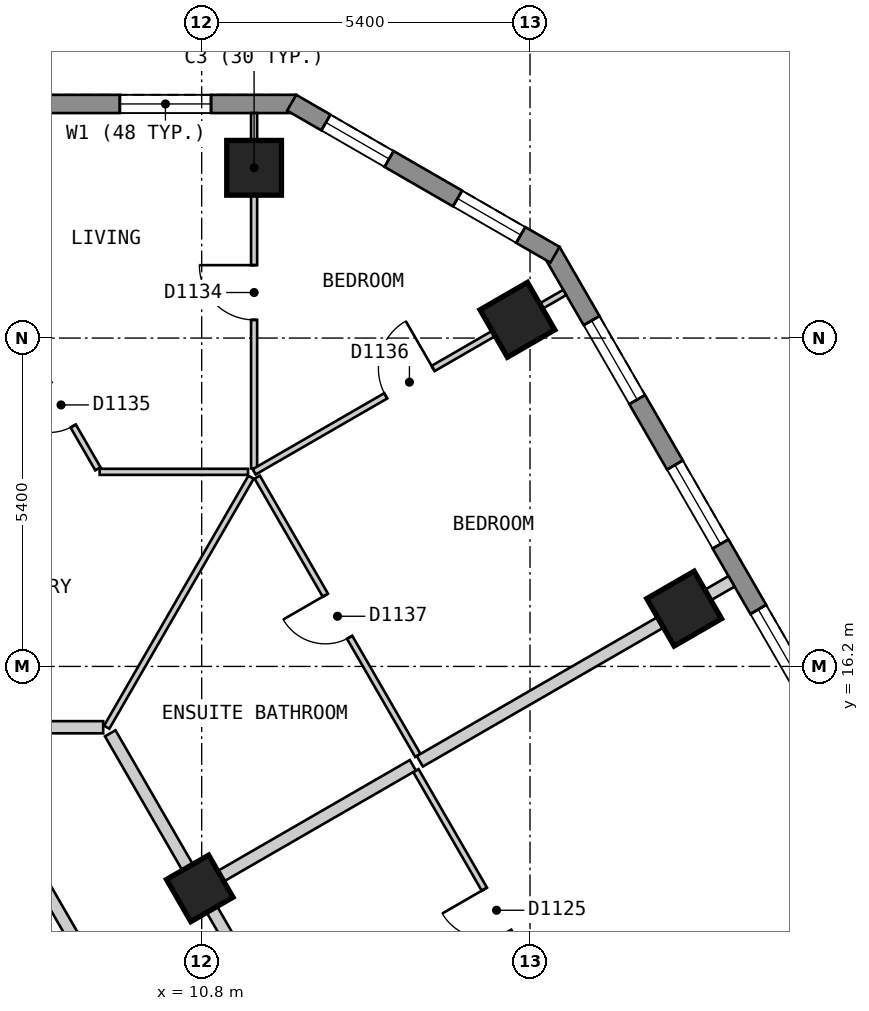
"""IFC4 building model, lengths in metres.
Left out: names, types, materials, properties, quantities, classifications, styles, units other than length and angle.
Written with IfcOpenShell. Run it as: python <this file> out.ifc"""

import sys

from ifc_helpers import new_model, si_unit, direction, frame, frame_2d, origin, origin_2d, place, context, subcontext, project, spatial, polyline, rectangle, outline, extrude, element, fill, save


model = new_model("IFC4")
c1 = context("Model", 3, precision=1e-05, world=origin(), true_north=direction((0.0, 1.0)))
c2 = subcontext(c1, "Body", "Model", "MODEL_VIEW")
j1 = project(units=[si_unit("LENGTHUNIT", "METRE"), si_unit("PLANEANGLEUNIT", "RADIAN")], contexts=[c1])
p1 = place(None, origin())
s1 = spatial("IfcSite", under=j1, at=p1, CompositionType="ELEMENT")
p2 = place(p1, origin())
s2 = spatial("IfcBuilding", under=s1, at=p2, CompositionType="ELEMENT")
p3 = place(p2, frame((0.0, 0.0, 138.6)))
s3 = spatial("IfcBuildingStorey", under=s2, at=p3, CompositionType="ELEMENT", Elevation=138.6)
for number, where, z_axis, x_axis in (
    (1, (11.662, 24.4, 0.0), (0.0, 0.0, 1.0), (-1.0, 0.0, 0.0)),
    (2, (18.735, 17.15, 0.0), (0.0, 0.0, 1.0), (-0.5, 0.866, 0.0)),
    (3, (15.993, 21.9, 0.0), (0.0, 0.0, 1.0), (-0.5, 0.866, 0.0)),
):
    element("IfcColumn", number, at=place(p3, frame(where, z_axis=z_axis, x_axis=x_axis)), inside=s3, PredefinedType="COLUMN", context=c2, shape_type="SweptSolid", body=[
        extrude(rectangle(XDim=0.9, YDim=0.9, at=origin_2d()), origin(), (0.0, 0.0, 1.0), 3.0),
    ])
p4 = place(p3, frame((10.768, 12.55, 0.0), z_axis=(0.0, 0.0, 1.0), x_axis=(-0.5, 0.866025403784, 0.0)))
e4 = element("IfcColumn", 4, at=p4, inside=s3, PredefinedType="COLUMN", context=c2, shape_type="SweptSolid", body=[
    extrude(rectangle(XDim=0.8, YDim=0.8, at=origin_2d()), origin(), (0.0, 0.0, 1.0), 3.0),
])
p5 = place(p3, frame((12.355, 25.45, 0.0), z_axis=(0.0, 0.0, 1.0), x_axis=(-1.0, 0.0, 0.0)))
e5 = element("IfcWall", 5, at=p5, inside=s3, PredefinedType="SOLIDWALL", context=c2, shape_type="SweptSolid", body=[
    extrude(outline(polyline([(0.0, -0.15), (24.71, -0.15), (24.63, 0.15), (0.08, 0.15), (0.0, -0.15)])), origin(), (0.0, 0.0, 1.0), 2.7),
])
p6 = place(p5, frame((1.401, 0.0, 0.15)))
e6 = element("IfcOpeningElement", 6, at=p6, cuts=e5, PredefinedType="OPENING", context=c2, shape_type="SweptSolid", body=[
    extrude(rectangle(XDim=1.5, YDim=2.1, at=frame_2d((0.75, 1.05))), frame((0.0, 0.16, 0.0), z_axis=(0.0, -1.0, 0.0), x_axis=(1.0, 0.0, 0.0)), (0.0, 0.0, 1.0), 0.32),
])
p7 = place(p5, frame((4.316, 0.0, 0.15)))
e7 = element("IfcOpeningElement", 7, at=p7, cuts=e5, PredefinedType="OPENING", context=c2, shape_type="SweptSolid", body=[
    extrude(rectangle(XDim=1.5, YDim=2.1, at=frame_2d((0.75, 1.05))), frame((0.0, 0.16, 0.0), z_axis=(0.0, -1.0, 0.0), x_axis=(1.0, 0.0, 0.0)), (0.0, 0.0, 1.0), 0.32),
])
p8 = place(p5, frame((7.232, 0.0, 0.15)))
e8 = element("IfcOpeningElement", 8, at=p8, cuts=e5, PredefinedType="OPENING", context=c2, shape_type="SweptSolid", body=[
    extrude(rectangle(XDim=1.5, YDim=2.1, at=frame_2d((0.75, 1.05))), frame((0.0, 0.16, 0.0), z_axis=(0.0, -1.0, 0.0), x_axis=(1.0, 0.0, 0.0)), (0.0, 0.0, 1.0), 0.32),
])
p9 = place(p5, frame((10.147, 0.0, 0.15)))
e9 = element("IfcOpeningElement", 9, at=p9, cuts=e5, PredefinedType="OPENING", context=c2, shape_type="SweptSolid", body=[
    extrude(rectangle(XDim=1.5, YDim=2.1, at=frame_2d((0.75, 1.05))), frame((0.0, 0.16, 0.0), z_axis=(0.0, -1.0, 0.0), x_axis=(1.0, 0.0, 0.0)), (0.0, 0.0, 1.0), 0.32),
])
p10 = place(p5, frame((13.063, 0.0, 0.15)))
e10 = element("IfcOpeningElement", 10, at=p10, cuts=e5, PredefinedType="OPENING", context=c2, shape_type="SweptSolid", body=[
    extrude(rectangle(XDim=1.5, YDim=2.1, at=frame_2d((0.75, 1.05))), frame((0.0, 0.16, 0.0), z_axis=(0.0, -1.0, 0.0), x_axis=(1.0, 0.0, 0.0)), (0.0, 0.0, 1.0), 0.32),
])
p11 = place(p5, frame((15.978, 0.0, 0.15)))
e11 = element("IfcOpeningElement", 11, at=p11, cuts=e5, PredefinedType="OPENING", context=c2, shape_type="SweptSolid", body=[
    extrude(rectangle(XDim=1.5, YDim=2.1, at=frame_2d((0.75, 1.05))), frame((0.0, 0.16, 0.0), z_axis=(0.0, -1.0, 0.0), x_axis=(1.0, 0.0, 0.0)), (0.0, 0.0, 1.0), 0.32),
])
p12 = place(p5, frame((18.894, 0.0, 0.15)))
e12 = element("IfcOpeningElement", 12, at=p12, cuts=e5, PredefinedType="OPENING", context=c2, shape_type="SweptSolid", body=[
    extrude(rectangle(XDim=1.5, YDim=2.1, at=frame_2d((0.75, 1.05))), frame((0.0, 0.16, 0.0), z_axis=(0.0, -1.0, 0.0), x_axis=(1.0, 0.0, 0.0)), (0.0, 0.0, 1.0), 0.32),
])
p13 = place(p5, frame((21.809, 0.0, 0.15)))
e13 = element("IfcOpeningElement", 13, at=p13, cuts=e5, PredefinedType="OPENING", context=c2, shape_type="SweptSolid", body=[
    extrude(rectangle(XDim=1.5, YDim=2.1, at=frame_2d((0.75, 1.05))), frame((0.0, 0.16, 0.0), z_axis=(0.0, -1.0, 0.0), x_axis=(1.0, 0.0, 0.0)), (0.0, 0.0, 1.0), 0.32),
])
p14 = place(p3, frame((28.218, 2.825, 0.0), z_axis=(0.0, 0.0, 1.0), x_axis=(-0.500020536353, 0.866013546791, 0.0)))
e14 = element("IfcWall", 14, at=p14, inside=s3, PredefinedType="SOLIDWALL", context=c2, shape_type="SweptSolid", body=[
    extrude(outline(polyline([(0.0, -0.15), (23.325, -0.15), (23.245, 0.15), (0.08, 0.15), (0.0, -0.15)])), origin(), (0.0, 0.0, 1.0), 2.7),
])
p15 = place(p14, frame((1.314, 0.0, 0.15)))
e15 = element("IfcOpeningElement", 15, at=p15, cuts=e14, PredefinedType="OPENING", context=c2, shape_type="SweptSolid", body=[
    extrude(rectangle(XDim=1.5, YDim=2.1, at=frame_2d((0.75, 1.05))), frame((0.0, 0.16, 0.0), z_axis=(0.0, -1.0, 0.0), x_axis=(1.0, 0.0, 0.0)), (0.0, 0.0, 1.0), 0.32),
])
p16 = place(p14, frame((4.056, 0.0, 0.15)))
e16 = element("IfcOpeningElement", 16, at=p16, cuts=e14, PredefinedType="OPENING", context=c2, shape_type="SweptSolid", body=[
    extrude(rectangle(XDim=1.5, YDim=2.1, at=frame_2d((0.75, 1.05))), frame((0.0, 0.16, 0.0), z_axis=(0.0, -1.0, 0.0), x_axis=(1.0, 0.0, 0.0)), (0.0, 0.0, 1.0), 0.32),
])
p17 = place(p14, frame((6.798, 0.0, 0.15)))
e17 = element("IfcOpeningElement", 17, at=p17, cuts=e14, PredefinedType="OPENING", context=c2, shape_type="SweptSolid", body=[
    extrude(rectangle(XDim=1.5, YDim=2.1, at=frame_2d((0.75, 1.05))), frame((0.0, 0.16, 0.0), z_axis=(0.0, -1.0, 0.0), x_axis=(1.0, 0.0, 0.0)), (0.0, 0.0, 1.0), 0.32),
])
p18 = place(p14, frame((9.541, 0.0, 0.15)))
e18 = element("IfcOpeningElement", 18, at=p18, cuts=e14, PredefinedType="OPENING", context=c2, shape_type="SweptSolid", body=[
    extrude(rectangle(XDim=1.5, YDim=2.1, at=frame_2d((0.75, 1.05))), frame((0.0, 0.16, 0.0), z_axis=(0.0, -1.0, 0.0), x_axis=(1.0, 0.0, 0.0)), (0.0, 0.0, 1.0), 0.32),
])
p19 = place(p14, frame((12.284, 0.0, 0.15)))
e19 = element("IfcOpeningElement", 19, at=p19, cuts=e14, PredefinedType="OPENING", context=c2, shape_type="SweptSolid", body=[
    extrude(rectangle(XDim=1.5, YDim=2.1, at=frame_2d((0.75, 1.05))), frame((0.0, 0.16, 0.0), z_axis=(0.0, -1.0, 0.0), x_axis=(1.0, 0.0, 0.0)), (0.0, 0.0, 1.0), 0.32),
])
p20 = place(p14, frame((15.027, 0.0, 0.15)))
e20 = element("IfcOpeningElement", 20, at=p20, cuts=e14, PredefinedType="OPENING", context=c2, shape_type="SweptSolid", body=[
    extrude(rectangle(XDim=1.5, YDim=2.1, at=frame_2d((0.75, 1.05))), frame((0.0, 0.16, 0.0), z_axis=(0.0, -1.0, 0.0), x_axis=(1.0, 0.0, 0.0)), (0.0, 0.0, 1.0), 0.32),
])
p21 = place(p14, frame((17.769, 0.0, 0.15)))
e21 = element("IfcOpeningElement", 21, at=p21, cuts=e14, PredefinedType="OPENING", context=c2, shape_type="SweptSolid", body=[
    extrude(rectangle(XDim=1.5, YDim=2.1, at=frame_2d((0.75, 1.05))), frame((0.0, 0.16, 0.0), z_axis=(0.0, -1.0, 0.0), x_axis=(1.0, 0.0, 0.0)), (0.0, 0.0, 1.0), 0.32),
])
p22 = place(p14, frame((20.511, 0.0, 0.15)))
e22 = element("IfcOpeningElement", 22, at=p22, cuts=e14, PredefinedType="OPENING", context=c2, shape_type="SweptSolid", body=[
    extrude(rectangle(XDim=1.5, YDim=2.1, at=frame_2d((0.75, 1.05))), frame((0.0, 0.16, 0.0), z_axis=(0.0, -1.0, 0.0), x_axis=(1.0, 0.0, 0.0)), (0.0, 0.0, 1.0), 0.32),
])
p23 = place(p3, frame((16.61, 22.97, 0.0), z_axis=(0.0, 0.0, 1.0), x_axis=(-0.866022959057, 0.500004234368, 0.0)))
e23 = element("IfcWall", 23, at=p23, inside=s3, PredefinedType="SOLIDWALL", context=c2, shape_type="SweptSolid", body=[
    extrude(outline(polyline([(0.0, -0.15), (5.0, -0.15), (4.92, 0.15), (0.08, 0.15), (0.0, -0.15)])), origin(), (0.0, 0.0, 1.0), 2.7),
])
p24 = place(p23, frame((0.65, 0.0, 0.15)))
e24 = element("IfcOpeningElement", 24, at=p24, cuts=e23, PredefinedType="OPENING", context=c2, shape_type="SweptSolid", body=[
    extrude(rectangle(XDim=1.2, YDim=2.1, at=frame_2d((0.6, 1.05))), frame((0.0, 0.16, 0.0), z_axis=(0.0, -1.0, 0.0), x_axis=(1.0, 0.0, 0.0)), (0.0, 0.0, 1.0), 0.32),
])
p25 = place(p23, frame((3.15, 0.0, 0.15)))
e25 = element("IfcOpeningElement", 25, at=p25, cuts=e23, PredefinedType="OPENING", context=c2, shape_type="SweptSolid", body=[
    extrude(rectangle(XDim=1.2, YDim=2.1, at=frame_2d((0.6, 1.05))), frame((0.0, 0.16, 0.0), z_axis=(0.0, -1.0, 0.0), x_axis=(1.0, 0.0, 0.0)), (0.0, 0.0, 1.0), 0.32),
])
p26 = place(p3, frame((7.967, 13.0, 0.0), z_axis=(0.0, 0.0, 1.0), x_axis=(0.50003774998, -0.866003607726, 0.0)))
e26 = element("IfcWall", 26, at=p26, inside=s3, PredefinedType="PARTITIONING", context=c2, shape_type="SweptSolid", body=[
    extrude(rectangle(XDim=14.433, YDim=0.2, at=frame_2d((7.217, 0.0))), origin(), (0.0, 0.0, 1.0), 2.7),
])
p27 = place(p26, frame((6.824, 0.0, 0.0)))
e27 = element("IfcOpeningElement", 27, at=p27, cuts=e26, PredefinedType="OPENING", context=c2, shape_type="SweptSolid", body=[
    extrude(rectangle(XDim=0.9, YDim=2.1, at=frame_2d((0.45, 1.05))), frame((0.0, 0.11, 0.0), z_axis=(0.0, -1.0, 0.0), x_axis=(1.0, 0.0, 0.0)), (0.0, 0.0, 1.0), 0.22),
])
p28 = place(p3, frame((9.296, 15.1, 0.0), z_axis=(0.0, 0.0, 1.0), x_axis=(0.499974024244, -0.866040400375, 0.0)))
e28 = element("IfcWall", 28, at=p28, inside=s3, PredefinedType="PARTITIONING", context=c2, shape_type="SweptSolid", body=[
    extrude(rectangle(XDim=16.857, YDim=0.2, at=frame_2d((8.429, 0.0))), origin(), (0.0, 0.0, 1.0), 2.7),
])
p29 = place(p28, frame((11.522, 0.0, 0.0)))
e29 = element("IfcOpeningElement", 29, at=p29, cuts=e28, PredefinedType="OPENING", context=c2, shape_type="SweptSolid", body=[
    extrude(rectangle(XDim=1.0, YDim=2.1, at=frame_2d((0.5, 1.05))), frame((0.0, 0.11, 0.0), z_axis=(0.0, -1.0, 0.0), x_axis=(1.0, 0.0, 0.0)), (0.0, 0.0, 1.0), 0.22),
])
p30 = place(p3, frame((6.697, 15.2, 0.0), z_axis=(0.0, 0.0, 1.0), x_axis=(1.0, 0.0, 0.0)))
e30 = element("IfcWall", 30, at=p30, inside=s3, PredefinedType="PARTITIONING", context=c2, shape_type="SweptSolid", body=[
    extrude(rectangle(XDim=2.483, YDim=0.2, at=frame_2d((1.241, 0.0))), origin(), (0.0, 0.0, 1.0), 2.7),
])
p31 = place(p3, frame((7.881, 21.55, 0.0), z_axis=(0.0, 0.0, 1.0), x_axis=(0.499821239653, -0.866128586522, 0.0)))
e31 = element("IfcWall", 31, at=p31, inside=s3, PredefinedType="PARTITIONING", context=c2, shape_type="SweptSolid", body=[
    extrude(rectangle(XDim=2.425, YDim=0.1, at=frame_2d((1.212, 0.0))), origin(), (0.0, 0.0, 1.0), 2.7),
])
p32 = place(p31, frame((0.812, 0.0, 0.0)))
e32 = element("IfcOpeningElement", 32, at=p32, cuts=e31, PredefinedType="OPENING", context=c2, shape_type="SweptSolid", body=[
    extrude(rectangle(XDim=0.8, YDim=2.1, at=frame_2d((0.4, 1.05))), frame((0.0, 0.06, 0.0), z_axis=(0.0, -1.0, 0.0), x_axis=(1.0, 0.0, 0.0)), (0.0, 0.0, 1.0), 0.12),
])
p33 = place(p3, frame((14.323, 14.487, 0.0), z_axis=(0.0, 0.0, 1.0), x_axis=(0.500011052545, -0.866019022501, 0.0)))
e33 = element("IfcWall", 33, at=p33, inside=s3, PredefinedType="PARTITIONING", context=c2, shape_type="SweptSolid", body=[
    extrude(rectangle(XDim=16.208, YDim=0.1, at=frame_2d((8.104, 0.0))), origin(), (0.0, 0.0, 1.0), 2.7),
])
p34 = place(p33, frame((8.484, 0.0, 0.0)))
e34 = element("IfcOpeningElement", 34, at=p34, cuts=e33, PredefinedType="OPENING", context=c2, shape_type="SweptSolid", body=[
    extrude(rectangle(XDim=0.9, YDim=2.1, at=frame_2d((0.45, 1.05))), frame((0.0, 0.06, 0.0), z_axis=(0.0, -1.0, 0.0), x_axis=(1.0, 0.0, 0.0)), (0.0, 0.0, 1.0), 0.12),
])
p35 = place(p33, frame((2.252, 0.0, 0.0)))
e35 = element("IfcOpeningElement", 35, at=p35, cuts=e33, PredefinedType="OPENING", context=c2, shape_type="SweptSolid", body=[
    extrude(rectangle(XDim=0.8, YDim=2.1, at=frame_2d((0.4, 1.05))), frame((0.0, 0.06, 0.0), z_axis=(0.0, -1.0, 0.0), x_axis=(1.0, 0.0, 0.0)), (0.0, 0.0, 1.0), 0.12),
])
p36 = place(p33, frame((13.167, 0.0, 0.0)))
e36 = element("IfcOpeningElement", 36, at=p36, cuts=e33, PredefinedType="OPENING", context=c2, shape_type="SweptSolid", body=[
    extrude(rectangle(XDim=0.8, YDim=2.1, at=frame_2d((0.4, 1.05))), frame((0.0, 0.06, 0.0), z_axis=(0.0, -1.0, 0.0), x_axis=(1.0, 0.0, 0.0)), (0.0, 0.0, 1.0), 0.12),
])
p37 = place(p3, frame((11.713, 19.313, 0.0), z_axis=(0.0, 0.0, 1.0), x_axis=(0.499945064984, -0.866057118208, 0.0)))
e37 = element("IfcWall", 37, at=p37, inside=s3, PredefinedType="PARTITIONING", context=c2, shape_type="SweptSolid", body=[
    extrude(rectangle(XDim=5.285, YDim=0.1, at=frame_2d((2.642, 0.0))), origin(), (0.0, 0.0, 1.0), 2.7),
])
p38 = place(p37, frame((2.242, 0.0, 0.0)))
e38 = element("IfcOpeningElement", 38, at=p38, cuts=e37, PredefinedType="OPENING", context=c2, shape_type="SweptSolid", body=[
    extrude(rectangle(XDim=0.8, YDim=2.1, at=frame_2d((0.4, 1.05))), frame((0.0, 0.06, 0.0), z_axis=(0.0, -1.0, 0.0), x_axis=(1.0, 0.0, 0.0)), (0.0, 0.0, 1.0), 0.12),
])
p39 = place(p3, frame((9.122, 19.4, 0.0), z_axis=(0.0, 0.0, 1.0), x_axis=(1.0, 0.0, 0.0)))
e39 = element("IfcWall", 39, at=p39, inside=s3, PredefinedType="PARTITIONING", context=c2, shape_type="SweptSolid", body=[
    extrude(rectangle(XDim=2.44, YDim=0.1, at=frame_2d((1.22, 0.0))), origin(), (0.0, 0.0, 1.0), 2.7),
])
p40 = place(p3, frame((9.238, 15.2, 0.0), z_axis=(0.0, 0.0, 1.0), x_axis=(0.499988022762, 0.866032318735, 0.0)))
e40 = element("IfcWall", 40, at=p40, inside=s3, PredefinedType="PARTITIONING", context=c2, shape_type="SweptSolid", body=[
    extrude(rectangle(XDim=4.748, YDim=0.1, at=frame_2d((2.374, 0.0))), origin(), (0.0, 0.0, 1.0), 2.7),
])
p41 = place(p3, frame((11.662, 19.456, 0.0), z_axis=(0.0, 0.0, 1.0), x_axis=(0.0, 1.0, 0.0)))
e41 = element("IfcWall", 41, at=p41, inside=s3, PredefinedType="PARTITIONING", context=c2, shape_type="SweptSolid", body=[
    extrude(rectangle(XDim=5.844, YDim=0.1, at=frame_2d((2.922, 0.0))), origin(), (0.0, 0.0, 1.0), 2.7),
])
p42 = place(p41, frame((2.443, 0.0, 0.0)))
e42 = element("IfcOpeningElement", 42, at=p42, cuts=e41, PredefinedType="OPENING", context=c2, shape_type="SweptSolid", body=[
    extrude(rectangle(XDim=0.9, YDim=2.1, at=frame_2d((0.45, 1.05))), frame((0.0, 0.06, 0.0), z_axis=(0.0, -1.0, 0.0), x_axis=(1.0, 0.0, 0.0)), (0.0, 0.0, 1.0), 0.12),
])
p43 = place(p3, frame((11.663, 19.4, 0.0), z_axis=(0.0, 0.0, 1.0), x_axis=(0.865941558533, 0.500145196124, 0.0)))
e43 = element("IfcWall", 43, at=p43, inside=s3, PredefinedType="PARTITIONING", context=c2, shape_type="SweptSolid", body=[
    extrude(rectangle(XDim=5.899, YDim=0.1, at=frame_2d((2.949, 0.0))), origin(), (0.0, 0.0, 1.0), 2.7),
])
p44 = place(p43, frame((2.499, 0.0, 0.0)))
e44 = element("IfcOpeningElement", 44, at=p44, cuts=e43, PredefinedType="OPENING", context=c2, shape_type="SweptSolid", body=[
    extrude(rectangle(XDim=0.9, YDim=2.1, at=frame_2d((0.45, 1.05))), frame((0.0, 0.06, 0.0), z_axis=(0.0, -1.0, 0.0), x_axis=(1.0, 0.0, 0.0)), (0.0, 0.0, 1.0), 0.12),
])
p45 = place(p3, frame((10.854, 12.6, 0.0), z_axis=(0.0, 0.0, 1.0), x_axis=(0.866031112038, 0.499990112884, 0.0)))
e45 = element("IfcWall", 45, at=p45, inside=s3, PredefinedType="PARTITIONING", context=c2, shape_type="SweptSolid", body=[
    extrude(rectangle(XDim=3.948, YDim=0.2, at=frame_2d((1.974, 0.0))), origin(), (0.0, 0.0, 1.0), 2.7),
])
p46 = place(p3, frame((14.388, 14.64, 0.0), z_axis=(0.0, 0.0, 1.0), x_axis=(0.866044090212, 0.499967632761, 0.0)))
e46 = element("IfcWall", 46, at=p46, inside=s3, PredefinedType="PARTITIONING", context=c2, shape_type="SweptSolid", body=[
    extrude(rectangle(XDim=5.919, YDim=0.2, at=frame_2d((2.959, 0.0))), origin(), (0.0, 0.0, 1.0), 2.7),
])
p47 = place(p6, origin())
e47 = element("IfcWindow", 47, at=p47, inside=s3, PartitioningType="SINGLE_PANEL", PredefinedType="WINDOW", context=c2, shape_type="SweptSolid", body=[
    extrude(rectangle(XDim=1.5, YDim=2.1, at=frame_2d((0.75, 1.05))), frame((0.0, 0.03, 0.0), z_axis=(0.0, -1.0, 0.0), x_axis=(1.0, 0.0, 0.0)), (0.0, 0.0, 1.0), 0.06),
])
fill(e6, e47)
p48 = place(p20, origin())
e48 = element("IfcWindow", 48, at=p48, inside=s3, PartitioningType="SINGLE_PANEL", PredefinedType="WINDOW", context=c2, shape_type="SweptSolid", body=[
    extrude(rectangle(XDim=1.5, YDim=2.1, at=frame_2d((0.75, 1.05))), frame((0.0, 0.03, 0.0), z_axis=(0.0, -1.0, 0.0), x_axis=(1.0, 0.0, 0.0)), (0.0, 0.0, 1.0), 0.06),
])
fill(e20, e48)
p49 = place(p21, origin())
e49 = element("IfcWindow", 49, at=p49, inside=s3, PartitioningType="SINGLE_PANEL", PredefinedType="WINDOW", context=c2, shape_type="SweptSolid", body=[
    extrude(rectangle(XDim=1.5, YDim=2.1, at=frame_2d((0.75, 1.05))), frame((0.0, 0.03, 0.0), z_axis=(0.0, -1.0, 0.0), x_axis=(1.0, 0.0, 0.0)), (0.0, 0.0, 1.0), 0.06),
])
fill(e21, e49)
p50 = place(p22, origin())
e50 = element("IfcWindow", 50, at=p50, inside=s3, PartitioningType="SINGLE_PANEL", PredefinedType="WINDOW", context=c2, shape_type="SweptSolid", body=[
    extrude(rectangle(XDim=1.5, YDim=2.1, at=frame_2d((0.75, 1.05))), frame((0.0, 0.03, 0.0), z_axis=(0.0, -1.0, 0.0), x_axis=(1.0, 0.0, 0.0)), (0.0, 0.0, 1.0), 0.06),
])
fill(e22, e50)
p51 = place(p24, origin())
e51 = element("IfcWindow", 51, at=p51, inside=s3, PartitioningType="SINGLE_PANEL", PredefinedType="WINDOW", context=c2, shape_type="SweptSolid", body=[
    extrude(rectangle(XDim=1.2, YDim=2.1, at=frame_2d((0.6, 1.05))), frame((0.0, 0.03, 0.0), z_axis=(0.0, -1.0, 0.0), x_axis=(1.0, 0.0, 0.0)), (0.0, 0.0, 1.0), 0.06),
])
fill(e24, e51)
p52 = place(p25, origin())
e52 = element("IfcWindow", 52, at=p52, inside=s3, PartitioningType="SINGLE_PANEL", PredefinedType="WINDOW", context=c2, shape_type="SweptSolid", body=[
    extrude(rectangle(XDim=1.2, YDim=2.1, at=frame_2d((0.6, 1.05))), frame((0.0, 0.03, 0.0), z_axis=(0.0, -1.0, 0.0), x_axis=(1.0, 0.0, 0.0)), (0.0, 0.0, 1.0), 0.06),
])
fill(e25, e52)
p53 = place(p35, origin())
e53 = element("IfcDoor", 53, at=p53, inside=s3, OperationType="SINGLE_SWING_LEFT", PredefinedType="DOOR", context=c2, shape_type="SweptSolid", body=[
    extrude(rectangle(XDim=0.8, YDim=2.1, at=frame_2d((0.4, 1.05))), frame((0.0, 0.025, 0.0), z_axis=(0.0, -1.0, 0.0), x_axis=(1.0, 0.0, 0.0)), (0.0, 0.0, 1.0), 0.05),
])
fill(e35, e53)
p54 = place(p42, origin())
e54 = element("IfcDoor", 54, at=p54, inside=s3, OperationType="SINGLE_SWING_RIGHT", PredefinedType="DOOR", context=c2, shape_type="SweptSolid", body=[
    extrude(rectangle(XDim=0.9, YDim=2.1, at=frame_2d((0.45, 1.05))), frame((0.0, 0.025, 0.0), z_axis=(0.0, -1.0, 0.0), x_axis=(1.0, 0.0, 0.0)), (0.0, 0.0, 1.0), 0.05),
])
fill(e42, e54)
p55 = place(p32, origin())
e55 = element("IfcDoor", 55, at=p55, inside=s3, OperationType="SINGLE_SWING_LEFT", PredefinedType="DOOR", context=c2, shape_type="SweptSolid", body=[
    extrude(rectangle(XDim=0.8, YDim=2.1, at=frame_2d((0.4, 1.05))), frame((0.0, 0.025, 0.0), z_axis=(0.0, -1.0, 0.0), x_axis=(1.0, 0.0, 0.0)), (0.0, 0.0, 1.0), 0.05),
])
fill(e32, e55)
p56 = place(p44, origin())
e56 = element("IfcDoor", 56, at=p56, inside=s3, OperationType="SINGLE_SWING_RIGHT", PredefinedType="DOOR", context=c2, shape_type="SweptSolid", body=[
    extrude(rectangle(XDim=0.9, YDim=2.1, at=frame_2d((0.45, 1.05))), frame((0.0, 0.025, 0.0), z_axis=(0.0, -1.0, 0.0), x_axis=(1.0, 0.0, 0.0)), (0.0, 0.0, 1.0), 0.05),
])
fill(e44, e56)
p57 = place(p38, origin())
e57 = element("IfcDoor", 57, at=p57, inside=s3, OperationType="SINGLE_SWING_LEFT", PredefinedType="DOOR", context=c2, shape_type="SweptSolid", body=[
    extrude(rectangle(XDim=0.8, YDim=2.1, at=frame_2d((0.4, 1.05))), frame((0.0, 0.025, 0.0), z_axis=(0.0, -1.0, 0.0), x_axis=(1.0, 0.0, 0.0)), (0.0, 0.0, 1.0), 0.05),
])
fill(e38, e57)
save(model, sys.argv[1])
